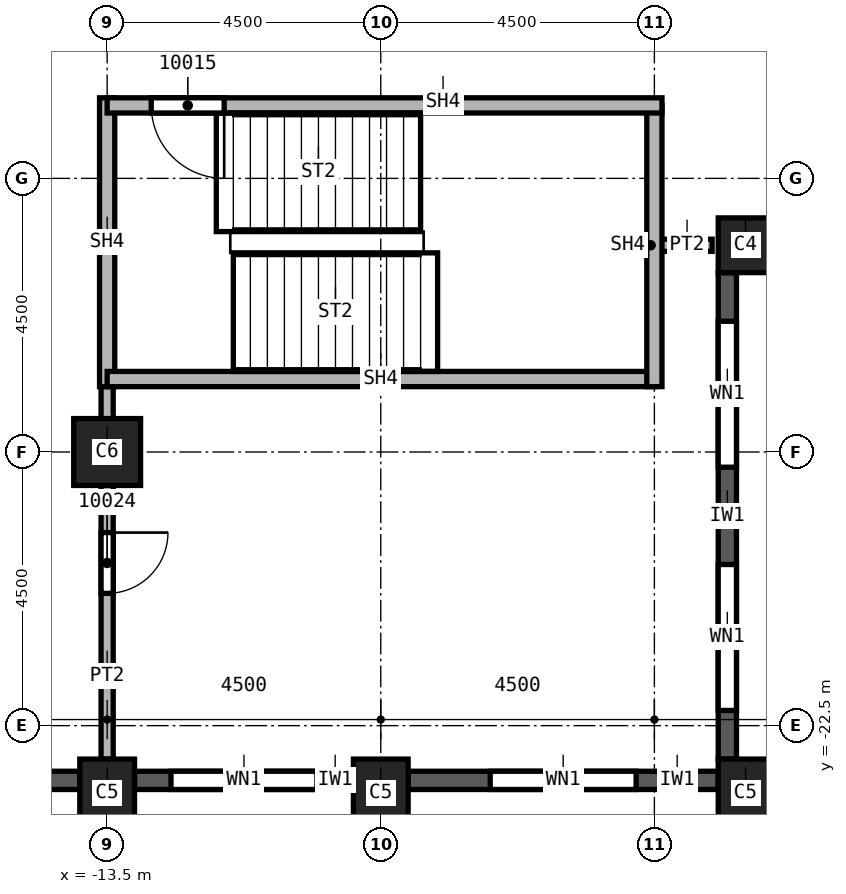
"""IFC4 building model, lengths in metres.
Left out: names, types, materials, properties, quantities, classifications, styles, units other than length and angle.
Written with IfcOpenShell. Run it as: python <this file> out.ifc"""

import sys

from ifc_helpers import new_model, si_unit, direction, frame, frame_2d, origin, origin_2d, place, context, subcontext, project, spatial, rectangle, extrude, element, fill, save


model = new_model("IFC4")
c1 = context("Model", 3, precision=1e-05, world=origin(), true_north=direction((0.0, 1.0)))
c2 = subcontext(c1, "Body", "Model", "MODEL_VIEW")
j1 = project(units=[si_unit("LENGTHUNIT", "METRE"), si_unit("PLANEANGLEUNIT", "RADIAN")], contexts=[c1])
p1 = place(None, origin())
s1 = spatial("IfcSite", under=j1, at=p1, CompositionType="ELEMENT")
p2 = place(p1, origin())
s2 = spatial("IfcBuilding", under=s1, at=p2, CompositionType="ELEMENT")
p3 = place(p2, frame((0.0, 0.0, 174.0)))
s3 = spatial("IfcBuildingStorey", under=s2, at=p3, CompositionType="ELEMENT", Elevation=174.0)
p4 = place(p3, frame((-13.5, -18.0, 0.0), z_axis=(0.0, 0.0, 1.0), x_axis=(1.0, 0.0, 0.0)))
e1 = element("IfcColumn", 1, at=p4, inside=s3, PredefinedType="COLUMN", context=c2, shape_type="SweptSolid", body=[
    extrude(rectangle(XDim=1.1, YDim=1.1, at=origin_2d()), origin(), (0.0, 0.0, 1.0), 3.59),
])
for number, where, z_axis, x_axis in (
    (2, (-3.0, -23.6, 0.0), (0.0, 0.0, 1.0), (1.0, 0.0, 0.0)),
    (3, (-9.0, -23.6, 0.0), (0.0, 0.0, 1.0), (1.0, 0.0, 0.0)),
    (4, (-13.5, -23.6, 0.0), (0.0, 0.0, 1.0), (1.0, 0.0, 0.0)),
):
    element("IfcColumn", number, at=place(p3, frame(where, z_axis=z_axis, x_axis=x_axis)), inside=s3, PredefinedType="COLUMN", context=c2, shape_type="SweptSolid", body=[
        extrude(rectangle(XDim=0.9, YDim=1.1, at=origin_2d()), origin(), (0.0, 0.0, 1.0), 3.59),
    ])
p5 = place(p3, frame((-3.0, -14.6, 0.0), z_axis=(0.0, 0.0, 1.0), x_axis=(1.0, 0.0, 0.0)))
e5 = element("IfcColumn", 5, at=p5, inside=s3, PredefinedType="COLUMN", context=c2, shape_type="SweptSolid", body=[
    extrude(rectangle(XDim=0.9, YDim=0.9, at=origin_2d()), origin(), (0.0, 0.0, 1.0), 3.59),
])
p6 = place(p3, frame((-17.55, -23.4, 0.0), z_axis=(0.0, 0.0, 1.0), x_axis=(1.0, 0.0, 0.0)))
e6 = element("IfcWall", 6, at=p6, inside=s3, PredefinedType="SOLIDWALL", context=c2, shape_type="SweptSolid", body=[
    extrude(rectangle(XDim=3.6, YDim=0.3, at=frame_2d((1.8, 0.0))), origin(), (0.0, 0.0, 1.0), 2.99),
])
p7 = place(p6, frame((0.775, 0.0, 0.8)))
e7 = element("IfcOpeningElement", 7, at=p7, cuts=e6, PredefinedType="OPENING", context=c2, shape_type="SweptSolid", body=[
    extrude(rectangle(XDim=1.0, YDim=1.95, at=frame_2d((0.5, 0.975))), frame((0.0, 0.15, 0.0), z_axis=(0.0, -1.0, 0.0), x_axis=(1.0, 0.0, 0.0)), (0.0, 0.0, 1.0), 0.3),
])
p8 = place(p6, frame((2.375, 0.0, 0.8)))
e8 = element("IfcOpeningElement", 8, at=p8, cuts=e6, PredefinedType="OPENING", context=c2, shape_type="SweptSolid", body=[
    extrude(rectangle(XDim=0.6, YDim=1.95, at=frame_2d((0.3, 0.975))), frame((0.0, 0.15, 0.0), z_axis=(0.0, -1.0, 0.0), x_axis=(1.0, 0.0, 0.0)), (0.0, 0.0, 1.0), 0.3),
])
p9 = place(p3, frame((-13.05, -23.4, 0.0), z_axis=(0.0, 0.0, 1.0), x_axis=(1.0, 0.0, 0.0)))
e9 = element("IfcWall", 9, at=p9, inside=s3, PredefinedType="SOLIDWALL", context=c2, shape_type="SweptSolid", body=[
    extrude(rectangle(XDim=3.6, YDim=0.3, at=frame_2d((1.8, 0.0))), origin(), (0.0, 0.0, 1.0), 2.99),
])
p10 = place(p9, frame((0.6, 0.0, 0.8)))
e10 = element("IfcOpeningElement", 10, at=p10, cuts=e9, PredefinedType="OPENING", context=c2, shape_type="SweptSolid", body=[
    extrude(rectangle(XDim=2.4, YDim=1.95, at=frame_2d((1.2, 0.975))), frame((0.0, 0.15, 0.0), z_axis=(0.0, -1.0, 0.0), x_axis=(1.0, 0.0, 0.0)), (0.0, 0.0, 1.0), 0.3),
])
p11 = place(p3, frame((-8.55, -23.4, 0.0), z_axis=(0.0, 0.0, 1.0), x_axis=(1.0, 0.0, 0.0)))
e11 = element("IfcWall", 11, at=p11, inside=s3, PredefinedType="SOLIDWALL", context=c2, shape_type="SweptSolid", body=[
    extrude(rectangle(XDim=5.1, YDim=0.3, at=frame_2d((2.55, 0.0))), origin(), (0.0, 0.0, 1.0), 2.99),
])
p12 = place(p11, frame((1.35, 0.0, 0.8)))
e12 = element("IfcOpeningElement", 12, at=p12, cuts=e11, PredefinedType="OPENING", context=c2, shape_type="SweptSolid", body=[
    extrude(rectangle(XDim=2.4, YDim=1.95, at=frame_2d((1.2, 0.975))), frame((0.0, 0.15, 0.0), z_axis=(0.0, -1.0, 0.0), x_axis=(1.0, 0.0, 0.0)), (0.0, 0.0, 1.0), 0.3),
])
p13 = place(p3, frame((-3.3, -23.05, 0.0), z_axis=(0.0, 0.0, 1.0), x_axis=(0.0, 1.0, 0.0)))
e13 = element("IfcWall", 13, at=p13, inside=s3, PredefinedType="SOLIDWALL", context=c2, shape_type="SweptSolid", body=[
    extrude(rectangle(XDim=8.0, YDim=0.3, at=frame_2d((4.0, 0.0))), origin(), (0.0, 0.0, 1.0), 2.99),
])
p14 = place(p13, frame((0.8, 0.0, 0.8)))
e14 = element("IfcOpeningElement", 14, at=p14, cuts=e13, PredefinedType="OPENING", context=c2, shape_type="SweptSolid", body=[
    extrude(rectangle(XDim=2.4, YDim=1.95, at=frame_2d((1.2, 0.975))), frame((0.0, 0.15, 0.0), z_axis=(0.0, -1.0, 0.0), x_axis=(1.0, 0.0, 0.0)), (0.0, 0.0, 1.0), 0.3),
])
p15 = place(p13, frame((4.8, 0.0, 0.8)))
e15 = element("IfcOpeningElement", 15, at=p15, cuts=e13, PredefinedType="OPENING", context=c2, shape_type="SweptSolid", body=[
    extrude(rectangle(XDim=2.4, YDim=1.95, at=frame_2d((1.2, 0.975))), frame((0.0, 0.15, 0.0), z_axis=(0.0, -1.0, 0.0), x_axis=(1.0, 0.0, 0.0)), (0.0, 0.0, 1.0), 0.3),
])
p16 = place(p3, frame((-13.5, -16.675, 0.0), z_axis=(0.0, 0.0, 1.0), x_axis=(0.0, -1.0, 0.0)))
e16 = element("IfcWall", 16, at=p16, inside=s3, PredefinedType="PARTITIONING", context=c2, shape_type="SweptSolid", body=[
    extrude(rectangle(XDim=6.375, YDim=0.2, at=frame_2d((3.188, 0.0))), origin(), (0.0, 0.0, 1.0), 3.59),
])
p17 = place(p16, frame((2.65, 0.0, 0.0)))
e17 = element("IfcOpeningElement", 17, at=p17, cuts=e16, PredefinedType="OPENING", context=c2, shape_type="SweptSolid", body=[
    extrude(rectangle(XDim=1.0, YDim=2.1, at=frame_2d((0.5, 1.05))), frame((0.0, 0.1, 0.0), z_axis=(0.0, -1.0, 0.0), x_axis=(1.0, 0.0, 0.0)), (0.0, 0.0, 1.0), 0.2),
])
p18 = place(p3, frame((-3.55, -14.6, 0.0), z_axis=(0.0, 0.0, 1.0), x_axis=(-1.0, 0.0, 0.0)))
e18 = element("IfcWall", 18, at=p18, inside=s3, PredefinedType="PARTITIONING", context=c2, shape_type="SweptSolid", body=[
    extrude(rectangle(XDim=0.95, YDim=0.2, at=frame_2d((0.475, 0.0))), origin(), (0.0, 0.0, 1.0), 3.59),
])
p19 = place(p3, frame((-13.5, -12.175, 0.0), z_axis=(0.0, 0.0, 1.0), x_axis=(0.0, -1.0, 0.0)))
e19 = element("IfcWall", 19, at=p19, inside=s3, PredefinedType="SOLIDWALL", context=c2, shape_type="SweptSolid", body=[
    extrude(rectangle(XDim=4.75, YDim=0.25, at=frame_2d((2.375, 0.0))), origin(), (0.0, 0.0, 1.0), 3.59),
])
p20 = place(p3, frame((-4.5, -16.8, 0.0), z_axis=(0.0, 0.0, 1.0), x_axis=(-1.0, 0.0, 0.0)))
e20 = element("IfcWall", 20, at=p20, inside=s3, PredefinedType="SOLIDWALL", context=c2, shape_type="SweptSolid", body=[
    extrude(rectangle(XDim=9.0, YDim=0.25, at=frame_2d((4.5, 0.0))), origin(), (0.0, 0.0, 1.0), 3.59),
])
p21 = place(p3, frame((-4.5, -12.3, 0.0), z_axis=(0.0, 0.0, 1.0), x_axis=(0.0, -1.0, 0.0)))
e21 = element("IfcWall", 21, at=p21, inside=s3, PredefinedType="SOLIDWALL", context=c2, shape_type="SweptSolid", body=[
    extrude(rectangle(XDim=4.625, YDim=0.25, at=frame_2d((2.312, 0.0))), origin(), (0.0, 0.0, 1.0), 3.59),
])
p22 = place(p3, frame((-4.375, -12.3, 0.0), z_axis=(0.0, 0.0, 1.0), x_axis=(-1.0, 0.0, 0.0)))
e22 = element("IfcWall", 22, at=p22, inside=s3, PredefinedType="SOLIDWALL", context=c2, shape_type="SweptSolid", body=[
    extrude(rectangle(XDim=9.125, YDim=0.25, at=frame_2d((4.562, 0.0))), origin(), (0.0, 0.0, 1.0), 3.59),
])
p23 = place(p22, frame((7.2, 0.0, 0.0)))
e23 = element("IfcOpeningElement", 23, at=p23, cuts=e22, PredefinedType="OPENING", context=c2, shape_type="SweptSolid", body=[
    extrude(rectangle(XDim=1.2, YDim=2.1, at=frame_2d((0.6, 1.05))), frame((0.0, 0.125, 0.0), z_axis=(0.0, -1.0, 0.0), x_axis=(1.0, 0.0, 0.0)), (0.0, 0.0, 1.0), 0.25),
])
p24 = place(p10, origin())
e24 = element("IfcWindow", 24, at=p24, inside=s3, PartitioningType="SINGLE_PANEL", PredefinedType="WINDOW", context=c2, shape_type="SweptSolid", body=[
    extrude(rectangle(XDim=2.4, YDim=1.95, at=frame_2d((1.2, 0.975))), frame((0.0, 0.03, 0.0), z_axis=(0.0, -1.0, 0.0), x_axis=(1.0, 0.0, 0.0)), (0.0, 0.0, 1.0), 0.06),
])
fill(e10, e24)
p25 = place(p12, origin())
e25 = element("IfcWindow", 25, at=p25, inside=s3, PartitioningType="SINGLE_PANEL", PredefinedType="WINDOW", context=c2, shape_type="SweptSolid", body=[
    extrude(rectangle(XDim=2.4, YDim=1.95, at=frame_2d((1.2, 0.975))), frame((0.0, 0.03, 0.0), z_axis=(0.0, -1.0, 0.0), x_axis=(1.0, 0.0, 0.0)), (0.0, 0.0, 1.0), 0.06),
])
fill(e12, e25)
p26 = place(p14, origin())
e26 = element("IfcWindow", 26, at=p26, inside=s3, PartitioningType="SINGLE_PANEL", PredefinedType="WINDOW", context=c2, shape_type="SweptSolid", body=[
    extrude(rectangle(XDim=2.4, YDim=1.95, at=frame_2d((1.2, 0.975))), frame((0.0, 0.03, 0.0), z_axis=(0.0, -1.0, 0.0), x_axis=(1.0, 0.0, 0.0)), (0.0, 0.0, 1.0), 0.06),
])
fill(e14, e26)
p27 = place(p15, origin())
e27 = element("IfcWindow", 27, at=p27, inside=s3, PartitioningType="SINGLE_PANEL", PredefinedType="WINDOW", context=c2, shape_type="SweptSolid", body=[
    extrude(rectangle(XDim=2.4, YDim=1.95, at=frame_2d((1.2, 0.975))), frame((0.0, 0.03, 0.0), z_axis=(0.0, -1.0, 0.0), x_axis=(1.0, 0.0, 0.0)), (0.0, 0.0, 1.0), 0.06),
])
fill(e15, e27)
p28 = place(p23, origin())
e28 = element("IfcDoor", 28, at=p28, inside=s3, OperationType="SINGLE_SWING_RIGHT", PredefinedType="DOOR", context=c2, shape_type="SweptSolid", body=[
    extrude(rectangle(XDim=1.2, YDim=2.1, at=frame_2d((0.6, 1.05))), frame((0.0, 0.025, 0.0), z_axis=(0.0, -1.0, 0.0), x_axis=(1.0, 0.0, 0.0)), (0.0, 0.0, 1.0), 0.05),
])
fill(e23, e28)
p29 = place(p17, origin())
e29 = element("IfcDoor", 29, at=p29, inside=s3, OperationType="SINGLE_SWING_LEFT", PredefinedType="DOOR", context=c2, shape_type="SweptSolid", body=[
    extrude(rectangle(XDim=1.0, YDim=2.1, at=frame_2d((0.5, 1.05))), frame((0.0, 0.025, 0.0), z_axis=(0.0, -1.0, 0.0), x_axis=(1.0, 0.0, 0.0)), (0.0, 0.0, 1.0), 0.05),
])
fill(e17, e29)
save(model, sys.argv[1])
